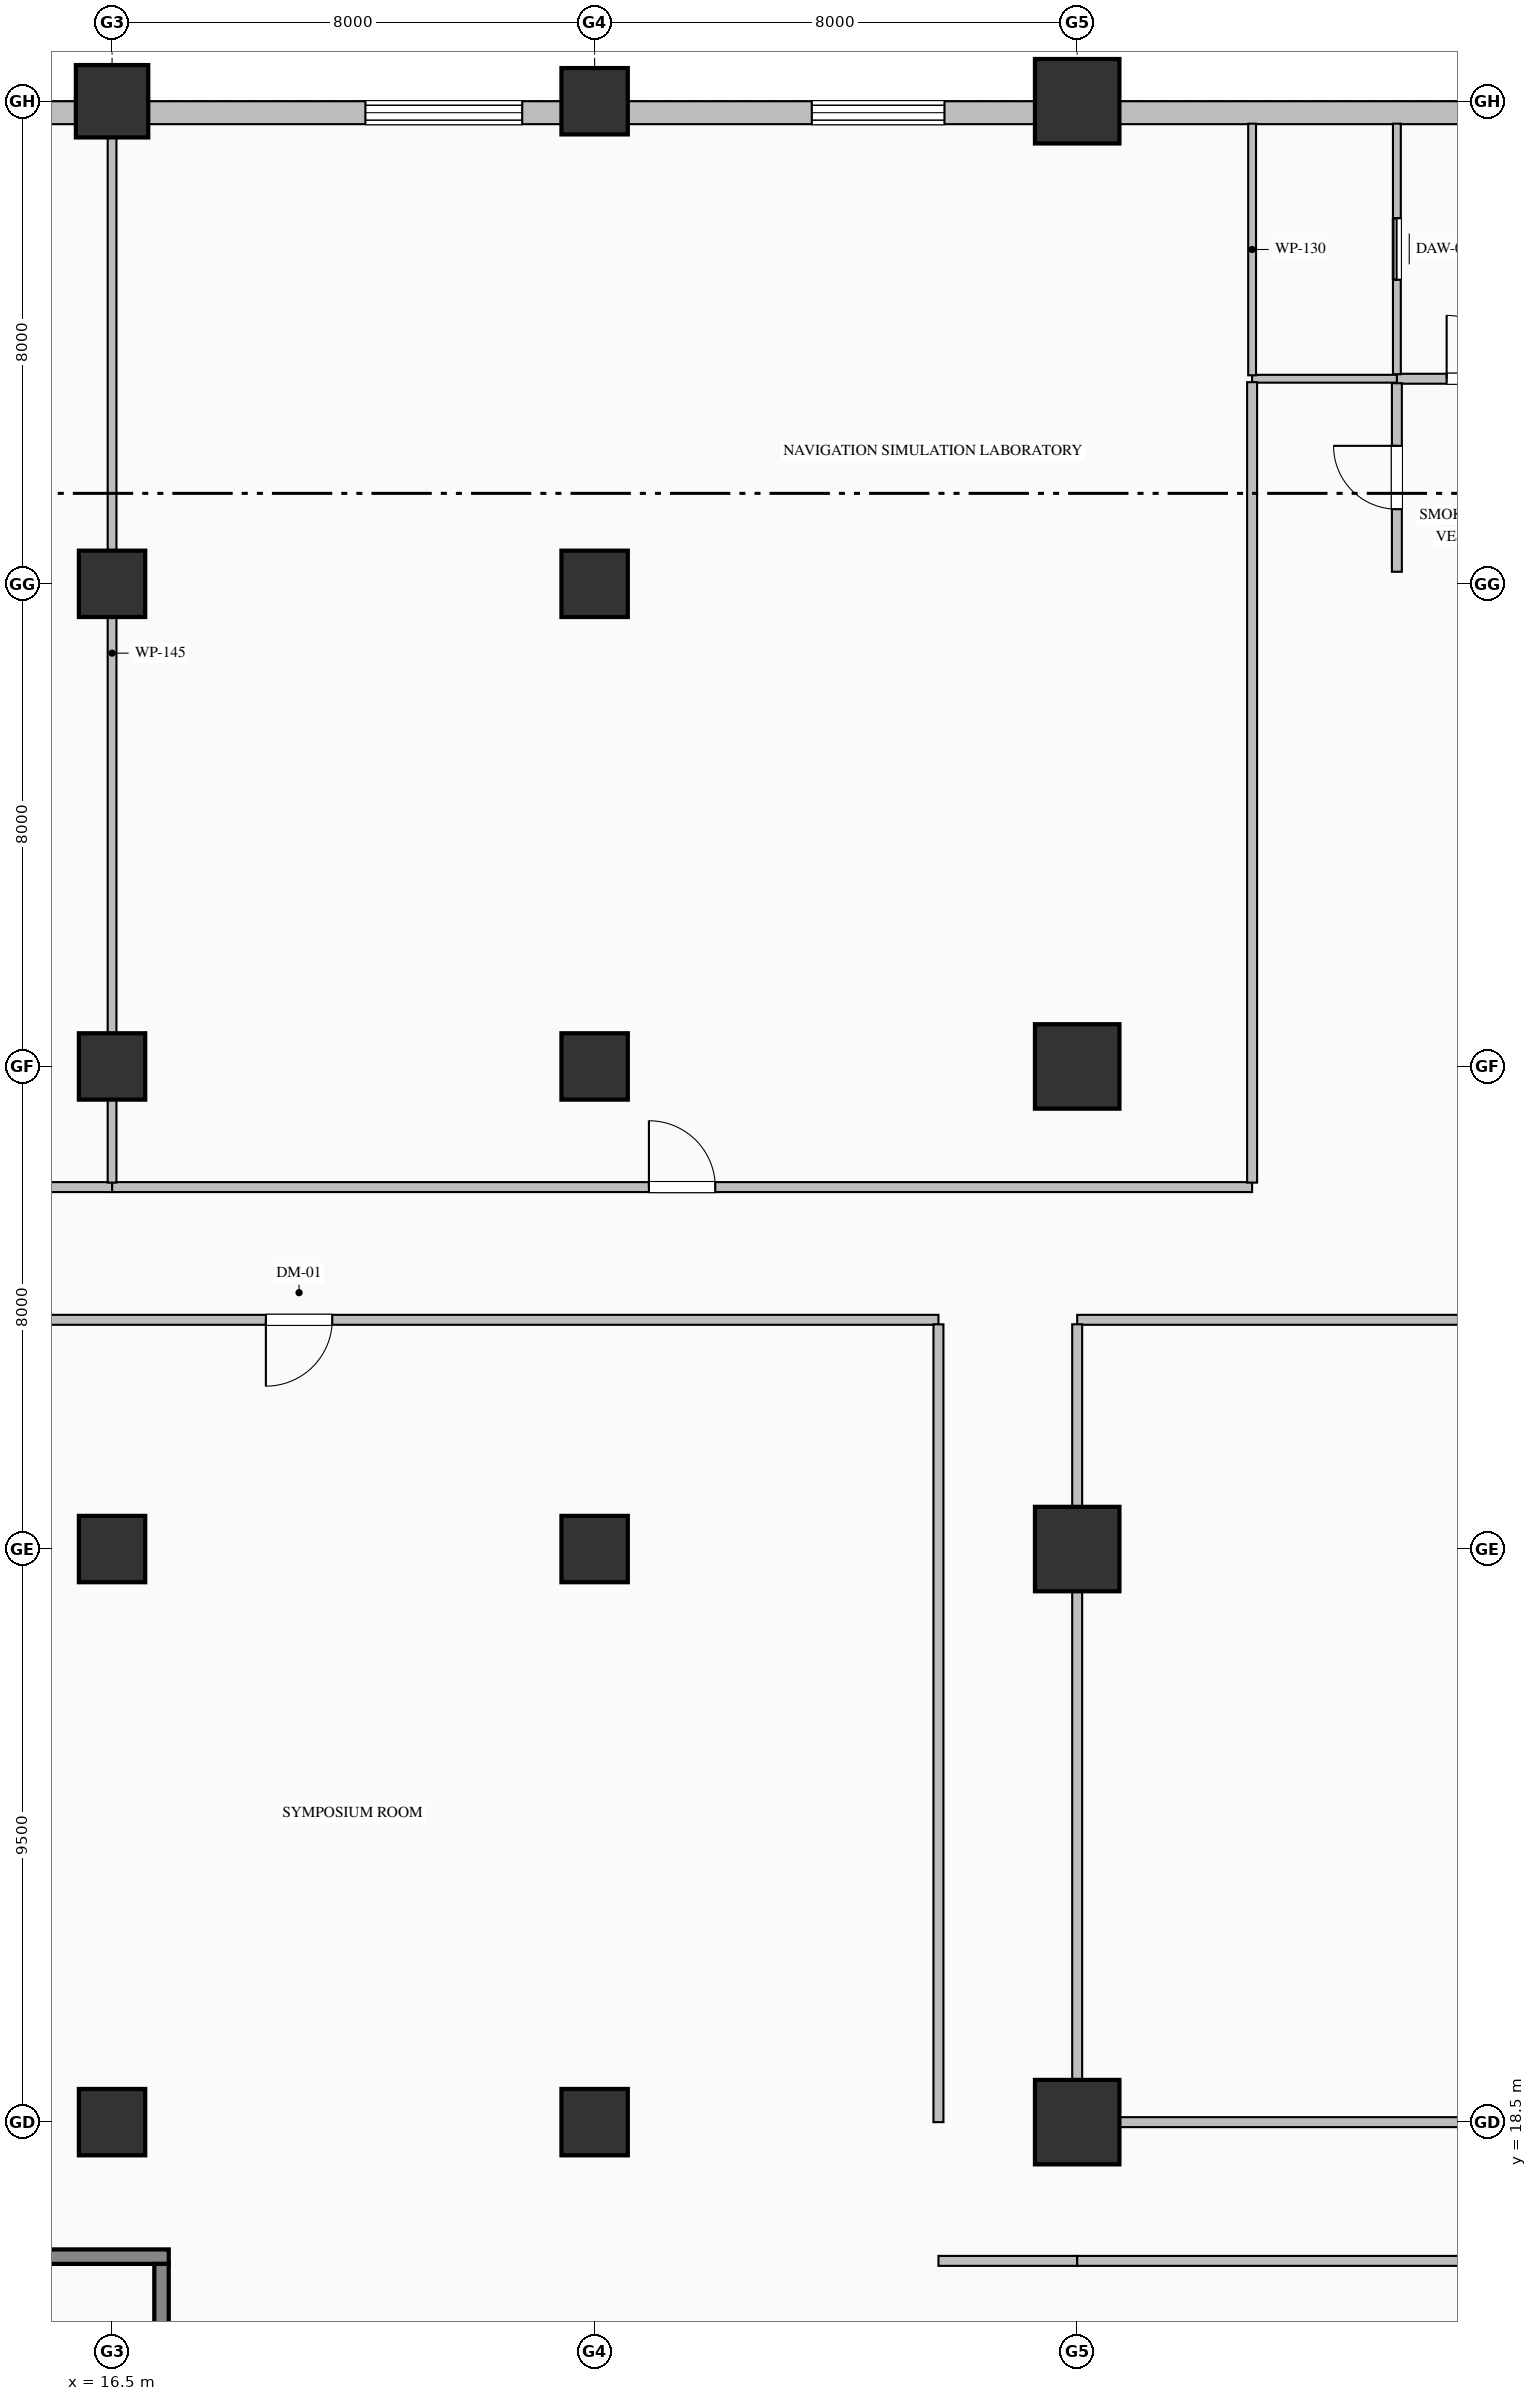
"""IFC4 building model, lengths in metres.
Left out: names, types, materials, properties, quantities, classifications, styles, units other than length and angle.
Written with IfcOpenShell. Run it as: python <this file> out.ifc"""

import sys

from ifc_helpers import new_model, si_unit, direction, frame, frame_2d, origin, origin_2d, place, context, subcontext, project, spatial, rectangle, hollow_rectangle, hollow_circle, extrude, element, fill, save


model = new_model("IFC4")
c1 = context("Model", 3, precision=1e-05, world=origin(), true_north=direction((0.0, 1.0)))
c2 = subcontext(c1, "Body", "Model", "MODEL_VIEW")
j1 = project(units=[si_unit("LENGTHUNIT", "METRE"), si_unit("PLANEANGLEUNIT", "RADIAN")], contexts=[c1])
p1 = place(None, origin())
s1 = spatial("IfcSite", under=j1, at=p1, CompositionType="ELEMENT")
p2 = place(p1, origin())
s2 = spatial("IfcBuilding", under=s1, at=p2, CompositionType="ELEMENT")
p3 = place(p2, frame((0.0, 0.0, 17.4)))
s3 = spatial("IfcBuildingStorey", under=s2, at=p3, CompositionType="ELEMENT", Elevation=17.4)
for number, where, z_axis, x_axis in (
    (1, (16.5, 18.5, -0.45), (0.0, 0.0, 1.0), (1.0, 0.0, 0.0)),
    (2, (16.5, 28.0, -0.45), (0.0, 0.0, 1.0), (1.0, 0.0, 0.0)),
    (3, (16.5, 36.0, -0.45), (0.0, 0.0, 1.0), (1.0, 0.0, 0.0)),
):
    element("IfcColumn", number, at=place(p3, frame(where, z_axis=z_axis, x_axis=x_axis)), inside=s3, PredefinedType="COLUMN", context=c2, shape_type="SweptSolid", body=[
        extrude(rectangle(XDim=1.1, YDim=1.1, at=origin_2d()), origin(), (0.0, 0.0, 1.0), 5.85),
    ])
p4 = place(p3, frame((16.5, 44.0, 0.0), z_axis=(0.0, 0.0, 1.0), x_axis=(1.0, 0.0, 0.0)))
e4 = element("IfcColumn", 4, at=p4, inside=s3, PredefinedType="COLUMN", context=c2, shape_type="SweptSolid", body=[
    extrude(rectangle(XDim=1.1, YDim=1.1, at=origin_2d()), origin(), (0.0, 0.0, 1.0), 5.4),
])
p5 = place(p3, frame((16.5, 52.0, 0.0), z_axis=(0.0, 0.0, 1.0), x_axis=(1.0, 0.0, 0.0)))
e5 = element("IfcColumn", 5, at=p5, inside=s3, PredefinedType="COLUMN", context=c2, shape_type="SweptSolid", body=[
    extrude(hollow_circle(Radius=0.6, WallThickness=0.04, at=origin_2d()), origin(), (0.0, 0.0, 1.0), 5.4),
])
for number, where, z_axis, x_axis in (
    (6, (24.5, 18.5, -0.45), (0.0, 0.0, 1.0), (1.0, 0.0, 0.0)),
    (7, (24.5, 28.0, -0.45), (0.0, 0.0, 1.0), (1.0, 0.0, 0.0)),
    (8, (24.5, 36.0, -0.45), (0.0, 0.0, 1.0), (1.0, 0.0, 0.0)),
):
    element("IfcColumn", number, at=place(p3, frame(where, z_axis=z_axis, x_axis=x_axis)), inside=s3, PredefinedType="COLUMN", context=c2, shape_type="SweptSolid", body=[
        extrude(rectangle(XDim=1.1, YDim=1.1, at=origin_2d()), origin(), (0.0, 0.0, 1.0), 5.85),
    ])
p6 = place(p3, frame((24.5, 44.0, 0.0), z_axis=(0.0, 0.0, 1.0), x_axis=(1.0, 0.0, 0.0)))
e9 = element("IfcColumn", 9, at=p6, inside=s3, PredefinedType="COLUMN", context=c2, shape_type="SweptSolid", body=[
    extrude(rectangle(XDim=1.1, YDim=1.1, at=origin_2d()), origin(), (0.0, 0.0, 1.0), 5.4),
])
p7 = place(p3, frame((24.5, 52.0, 0.0), z_axis=(0.0, 0.0, 1.0), x_axis=(1.0, 0.0, 0.0)))
e10 = element("IfcColumn", 10, at=p7, inside=s3, PredefinedType="COLUMN", context=c2, shape_type="SweptSolid", body=[
    extrude(hollow_rectangle(XDim=1.1, YDim=1.1, WallThickness=0.04, at=origin_2d()), origin(), (0.0, 0.0, 1.0), 5.4),
])
for number, where, z_axis, x_axis in (
    (11, (32.5, 18.5, 0.0), (0.0, 0.0, 1.0), (1.0, 0.0, 0.0)),
    (12, (32.5, 28.0, 0.0), (0.0, 0.0, 1.0), (1.0, 0.0, 0.0)),
    (13, (32.5, 36.0, 0.0), (0.0, 0.0, 1.0), (1.0, 0.0, 0.0)),
    (14, (32.5, 52.0, 0.0), (0.0, 0.0, 1.0), (1.0, 0.0, 0.0)),
):
    element("IfcColumn", number, at=place(p3, frame(where, z_axis=z_axis, x_axis=x_axis)), inside=s3, PredefinedType="COLUMN", context=c2, shape_type="SweptSolid", body=[
        extrude(hollow_rectangle(XDim=1.4, YDim=1.4, WallThickness=0.05, at=origin_2d()), origin(), (0.0, 0.0, 1.0), 5.4),
    ])
p8 = place(p3, frame((4.0, 51.81, 0.0), z_axis=(0.0, 0.0, 1.0), x_axis=(1.0, 0.0, 0.0)))
e15 = element("IfcWall", 15, at=p8, inside=s3, PredefinedType="SOLIDWALL", context=c2, shape_type="SweptSolid", body=[
    extrude(rectangle(XDim=36.52, YDim=0.38, at=frame_2d((18.26, 0.0))), origin(), (0.0, 0.0, 1.0), 4.64),
])
p9 = place(p8, frame((16.7, 0.0, 0.85)))
e16 = element("IfcOpeningElement", 16, at=p9, cuts=e15, PredefinedType="OPENING", context=c2, shape_type="SweptSolid", body=[
    extrude(rectangle(XDim=2.6, YDim=3.1, at=frame_2d((1.3, 1.55))), frame((0.0, 0.2, 0.0), z_axis=(0.0, -1.0, 0.0), x_axis=(1.0, 0.0, 0.0)), (0.0, 0.0, 1.0), 0.4),
])
p10 = place(p8, frame((24.1, 0.0, 0.9)))
e17 = element("IfcOpeningElement", 17, at=p10, cuts=e15, PredefinedType="OPENING", context=c2, shape_type="SweptSolid", body=[
    extrude(rectangle(XDim=2.2, YDim=2.65, at=frame_2d((1.1, 1.325))), frame((0.0, 0.2, 0.0), z_axis=(0.0, -1.0, 0.0), x_axis=(1.0, 0.0, 0.0)), (0.0, 0.0, 1.0), 0.4),
])
p11 = place(p3, frame((9.16, 16.27, 0.0), z_axis=(0.0, 0.0, 1.0), x_axis=(1.0, 0.0, 0.0)))
e18 = element("IfcWall", 18, at=p11, inside=s3, PredefinedType="SOLIDWALL", context=c2, shape_type="SweptSolid", body=[
    extrude(rectangle(XDim=8.28, YDim=0.24, at=frame_2d((4.14, 0.0))), origin(), (0.0, 0.0, 1.0), 5.4),
])
p12 = place(p3, frame((17.32, 12.8, 0.0), z_axis=(0.0, 0.0, 1.0), x_axis=(0.0, 1.0, 0.0)))
e19 = element("IfcWall", 19, at=p12, inside=s3, PredefinedType="SOLIDWALL", context=c2, shape_type="SweptSolid", body=[
    extrude(rectangle(XDim=3.35, YDim=0.24, at=frame_2d((1.675, 0.0))), origin(), (0.0, 0.0, 1.0), 5.4),
])
p13 = place(p3, frame((37.8, 47.4, 0.0), z_axis=(0.0, 0.0, 1.0), x_axis=(1.0, 0.0, 0.0)))
e20 = element("IfcWall", 20, at=p13, inside=s3, PredefinedType="PARTITIONING", context=c2, shape_type="SweptSolid", body=[
    extrude(rectangle(XDim=2.7, YDim=0.165, at=frame_2d((1.35, 0.0))), origin(), (0.0, 0.0, 1.0), 5.14),
])
p14 = place(p13, frame((0.825, 0.0, 0.0)))
e21 = element("IfcOpeningElement", 21, at=p14, cuts=e20, PredefinedType="OPENING", context=c2, shape_type="SweptSolid", body=[
    extrude(rectangle(XDim=1.05, YDim=2.15, at=frame_2d((0.525, 1.075))), frame((0.0, 0.093, 0.0), z_axis=(0.0, -1.0, 0.0), x_axis=(1.0, 0.0, 0.0)), (0.0, 0.0, 1.0), 0.185),
])
p15 = place(p3, frame((37.8, 44.2, 0.0), z_axis=(0.0, 0.0, 1.0), x_axis=(0.0, 1.0, 0.0)))
e22 = element("IfcWall", 22, at=p15, inside=s3, PredefinedType="PARTITIONING", context=c2, shape_type="SweptSolid", body=[
    extrude(rectangle(XDim=3.125, YDim=0.165, at=frame_2d((1.563, 0.0))), origin(), (0.0, 0.0, 1.0), 5.14),
])
p16 = place(p15, frame((1.038, 0.0, 0.0)))
e23 = element("IfcOpeningElement", 23, at=p16, cuts=e22, PredefinedType="OPENING", context=c2, shape_type="SweptSolid", body=[
    extrude(rectangle(XDim=1.05, YDim=2.15, at=frame_2d((0.525, 1.075))), frame((0.0, 0.093, 0.0), z_axis=(0.0, -1.0, 0.0), x_axis=(1.0, 0.0, 0.0)), (0.0, 0.0, 1.0), 0.185),
])
p17 = place(p3, frame((37.8, 47.475, 0.0), z_axis=(0.0, 0.0, 1.0), x_axis=(0.0, 1.0, 0.0)))
e24 = element("IfcWall", 24, at=p17, inside=s3, PredefinedType="PARTITIONING", context=c2, shape_type="SweptSolid", body=[
    extrude(rectangle(XDim=4.153, YDim=0.13, at=frame_2d((2.077, 0.0))), origin(), (0.0, 0.0, 1.0), 5.14),
])
p18 = place(p17, frame((1.567, 0.0, 0.0)))
e25 = element("IfcOpeningElement", 25, at=p18, cuts=e24, PredefinedType="OPENING", context=c2, shape_type="SweptSolid", body=[
    extrude(rectangle(XDim=1.02, YDim=2.15, at=frame_2d((0.51, 1.075))), frame((0.0, 0.075, 0.0), z_axis=(0.0, -1.0, 0.0), x_axis=(1.0, 0.0, 0.0)), (0.0, 0.0, 1.0), 0.15),
])
p19 = place(p3, frame((37.8, 47.4, 0.0), z_axis=(0.0, 0.0, 1.0), x_axis=(-1.0, 0.0, 0.0)))
e26 = element("IfcWall", 26, at=p19, inside=s3, PredefinedType="PARTITIONING", context=c2, shape_type="SweptSolid", body=[
    extrude(rectangle(XDim=2.4, YDim=0.13, at=frame_2d((1.2, 0.0))), origin(), (0.0, 0.0, 1.0), 5.14),
])
p20 = place(p3, frame((35.4, 47.457, 0.0), z_axis=(0.0, 0.0, 1.0), x_axis=(0.0, 1.0, 0.0)))
e27 = element("IfcWall", 27, at=p20, inside=s3, PredefinedType="PARTITIONING", context=c2, shape_type="SweptSolid", body=[
    extrude(rectangle(XDim=4.171, YDim=0.13, at=frame_2d((2.085, 0.0))), origin(), (0.0, 0.0, 1.0), 5.14),
])
p21 = place(p3, frame((56.5, 31.8, 0.0), z_axis=(0.0, 0.0, 1.0), x_axis=(-1.0, 0.0, 0.0)))
e28 = element("IfcWall", 28, at=p21, inside=s3, PredefinedType="PARTITIONING", context=c2, shape_type="SweptSolid", body=[
    extrude(rectangle(XDim=24.0, YDim=0.165, at=frame_2d((12.0, 0.0))), origin(), (0.0, 0.0, 1.0), 5.14),
])
p22 = place(p21, frame((11.45, 0.0, 0.0)))
e29 = element("IfcOpeningElement", 29, at=p22, cuts=e28, PredefinedType="OPENING", context=c2, shape_type="SweptSolid", body=[
    extrude(rectangle(XDim=1.1, YDim=2.2, at=frame_2d((0.55, 1.1))), frame((0.0, 0.093, 0.0), z_axis=(0.0, -1.0, 0.0), x_axis=(1.0, 0.0, 0.0)), (0.0, 0.0, 1.0), 0.185),
])
p23 = place(p3, frame((30.2, 31.8, 0.0), z_axis=(0.0, 0.0, 1.0), x_axis=(-1.0, 0.0, 0.0)))
e30 = element("IfcWall", 30, at=p23, inside=s3, PredefinedType="PARTITIONING", context=c2, shape_type="SweptSolid", body=[
    extrude(rectangle(XDim=21.2, YDim=0.165, at=frame_2d((10.6, 0.0))), origin(), (0.0, 0.0, 1.0), 5.14),
])
p24 = place(p23, frame((10.05, 0.0, 0.0)))
e31 = element("IfcOpeningElement", 31, at=p24, cuts=e30, PredefinedType="OPENING", context=c2, shape_type="SweptSolid", body=[
    extrude(rectangle(XDim=1.1, YDim=2.2, at=frame_2d((0.55, 1.1))), frame((0.0, 0.093, 0.0), z_axis=(0.0, -1.0, 0.0), x_axis=(1.0, 0.0, 0.0)), (0.0, 0.0, 1.0), 0.185),
])
p25 = place(p3, frame((16.5, 34.0, 0.0), z_axis=(0.0, 0.0, 1.0), x_axis=(1.0, 0.0, 0.0)))
e32 = element("IfcWall", 32, at=p25, inside=s3, PredefinedType="PARTITIONING", context=c2, shape_type="SweptSolid", body=[
    extrude(rectangle(XDim=18.9, YDim=0.165, at=frame_2d((9.45, 0.0))), origin(), (0.0, 0.0, 1.0), 5.14),
])
p26 = place(p25, frame((8.9, 0.0, 0.0)))
e33 = element("IfcOpeningElement", 33, at=p26, cuts=e32, PredefinedType="OPENING", context=c2, shape_type="SweptSolid", body=[
    extrude(rectangle(XDim=1.1, YDim=2.2, at=frame_2d((0.55, 1.1))), frame((0.0, 0.093, 0.0), z_axis=(0.0, -1.0, 0.0), x_axis=(1.0, 0.0, 0.0)), (0.0, 0.0, 1.0), 0.185),
])
p27 = place(p3, frame((9.0, 34.0, 0.0), z_axis=(0.0, 0.0, 1.0), x_axis=(1.0, 0.0, 0.0)))
e34 = element("IfcWall", 34, at=p27, inside=s3, PredefinedType="PARTITIONING", context=c2, shape_type="SweptSolid", body=[
    extrude(rectangle(XDim=7.5, YDim=0.165, at=frame_2d((3.75, 0.0))), origin(), (0.0, 0.0, 1.0), 5.14),
])
p28 = place(p27, frame((3.25, 0.0, 0.0)))
e35 = element("IfcOpeningElement", 35, at=p28, cuts=e34, PredefinedType="OPENING", context=c2, shape_type="SweptSolid", body=[
    extrude(rectangle(XDim=1.0, YDim=2.15, at=frame_2d((0.5, 1.075))), frame((0.0, 0.093, 0.0), z_axis=(0.0, -1.0, 0.0), x_axis=(1.0, 0.0, 0.0)), (0.0, 0.0, 1.0), 0.185),
])
p29 = place(p3, frame((35.4, 34.074, 0.0), z_axis=(0.0, 0.0, 1.0), x_axis=(0.0, 1.0, 0.0)))
e36 = element("IfcWall", 36, at=p29, inside=s3, PredefinedType="PARTITIONING", context=c2, shape_type="SweptSolid", body=[
    extrude(rectangle(XDim=13.269, YDim=0.165, at=frame_2d((6.634, 0.0))), origin(), (0.0, 0.0, 1.0), 5.14),
])
p30 = place(p3, frame((32.5, 31.726, 0.0), z_axis=(0.0, 0.0, 1.0), x_axis=(0.0, -1.0, 0.0)))
e37 = element("IfcWall", 37, at=p30, inside=s3, PredefinedType="PARTITIONING", context=c2, shape_type="SweptSolid", body=[
    extrude(rectangle(XDim=13.151, YDim=0.165, at=frame_2d((6.576, 0.0))), origin(), (0.0, 0.0, 1.0), 4.232),
])
p31 = place(p3, frame((30.2, 18.5, 0.0), z_axis=(0.0, 0.0, 1.0), x_axis=(0.0, 1.0, 0.0)))
e38 = element("IfcWall", 38, at=p31, inside=s3, PredefinedType="PARTITIONING", context=c2, shape_type="SweptSolid", body=[
    extrude(rectangle(XDim=13.226, YDim=0.165, at=frame_2d((6.613, 0.0))), origin(), (0.0, 0.0, 1.0), 5.14),
])
p32 = place(p3, frame((32.5, 16.2, 0.0), z_axis=(0.0, 0.0, 1.0), x_axis=(-1.0, 0.0, 0.0)))
e39 = element("IfcWall", 39, at=p32, inside=s3, PredefinedType="PARTITIONING", context=c2, shape_type="SweptSolid", body=[
    extrude(rectangle(XDim=2.3, YDim=0.165, at=frame_2d((1.15, 0.0))), origin(), (0.0, 0.0, 1.0), 5.14),
])
p33 = place(p3, frame((32.5, 18.5, 0.0), z_axis=(0.0, 0.0, 1.0), x_axis=(1.0, 0.0, 0.0)))
e40 = element("IfcWall", 40, at=p33, inside=s3, PredefinedType="PARTITIONING", context=c2, shape_type="SweptSolid", body=[
    extrude(rectangle(XDim=24.0, YDim=0.165, at=frame_2d((12.0, 0.0))), origin(), (0.0, 0.0, 1.0), 4.232),
])
p34 = place(p3, frame((48.5, 16.2, 0.0), z_axis=(0.0, 0.0, 1.0), x_axis=(-1.0, 0.0, 0.0)))
e41 = element("IfcWall", 41, at=p34, inside=s3, PredefinedType="PARTITIONING", context=c2, shape_type="SweptSolid", body=[
    extrude(rectangle(XDim=16.0, YDim=0.165, at=frame_2d((8.0, 0.0))), origin(), (0.0, 0.0, 1.0), 5.14),
])
p35 = place(p34, frame((7.45, 0.0, 0.0)))
e42 = element("IfcOpeningElement", 42, at=p35, cuts=e41, PredefinedType="OPENING", context=c2, shape_type="SweptSolid", body=[
    extrude(rectangle(XDim=1.1, YDim=2.2, at=frame_2d((0.55, 1.1))), frame((0.0, 0.093, 0.0), z_axis=(0.0, -1.0, 0.0), x_axis=(1.0, 0.0, 0.0)), (0.0, 0.0, 1.0), 0.185),
])
p36 = place(p3, frame((16.5, 34.074, 0.0), z_axis=(0.0, 0.0, 1.0), x_axis=(0.0, 1.0, 0.0)))
e43 = element("IfcWall", 43, at=p36, inside=s3, PredefinedType="PARTITIONING", context=c2, shape_type="SweptSolid", body=[
    extrude(rectangle(XDim=17.553, YDim=0.145, at=frame_2d((8.777, 0.0))), origin(), (0.0, 0.0, 1.0), 4.232),
])
p37 = place(p9, origin())
e44 = element("IfcWindow", 44, at=p37, inside=s3, PartitioningType="TRIPLE_PANEL_VERTICAL", PredefinedType="WINDOW", context=c2, shape_type="SweptSolid", body=[
    extrude(rectangle(XDim=2.6, YDim=3.1, at=frame_2d((1.3, 1.55))), frame((0.0, 0.15, 0.0), z_axis=(0.0, -1.0, 0.0), x_axis=(1.0, 0.0, 0.0)), (0.0, 0.0, 1.0), 0.06),
])
fill(e16, e44)
p38 = place(p10, origin())
e45 = element("IfcWindow", 45, at=p38, inside=s3, PartitioningType="TRIPLE_PANEL_VERTICAL", PredefinedType="WINDOW", context=c2, shape_type="SweptSolid", body=[
    extrude(rectangle(XDim=2.2, YDim=2.65, at=frame_2d((1.1, 1.325))), frame((0.0, 0.15, 0.0), z_axis=(0.0, -1.0, 0.0), x_axis=(1.0, 0.0, 0.0)), (0.0, 0.0, 1.0), 0.06),
])
fill(e17, e45)
p39 = place(p16, origin())
e46 = element("IfcDoor", 46, at=p39, inside=s3, OperationType="SINGLE_SWING_RIGHT", PredefinedType="DOOR", context=c2, shape_type="SweptSolid", body=[
    extrude(rectangle(XDim=1.05, YDim=2.15, at=frame_2d((0.525, 1.075))), frame((0.0, 0.025, 0.0), z_axis=(0.0, -1.0, 0.0), x_axis=(1.0, 0.0, 0.0)), (0.0, 0.0, 1.0), 0.05),
])
fill(e23, e46)
p40 = place(p14, origin())
e47 = element("IfcDoor", 47, at=p40, inside=s3, OperationType="SINGLE_SWING_LEFT", PredefinedType="DOOR", context=c2, shape_type="SweptSolid", body=[
    extrude(rectangle(XDim=1.05, YDim=2.15, at=frame_2d((0.525, 1.075))), frame((0.0, 0.025, 0.0), z_axis=(0.0, -1.0, 0.0), x_axis=(1.0, 0.0, 0.0)), (0.0, 0.0, 1.0), 0.05),
])
fill(e21, e47)
p41 = place(p18, origin())
e48 = element("IfcDoor", 48, at=p41, inside=s3, OperationType="SLIDING_TO_LEFT", PredefinedType="DOOR", context=c2, shape_type="SweptSolid", body=[
    extrude(rectangle(XDim=1.02, YDim=2.15, at=frame_2d((0.51, 1.075))), frame((0.0, 0.025, 0.0), z_axis=(0.0, -1.0, 0.0), x_axis=(1.0, 0.0, 0.0)), (0.0, 0.0, 1.0), 0.05),
])
fill(e25, e48)
p42 = place(p24, origin())
e49 = element("IfcDoor", 49, at=p42, inside=s3, OperationType="SINGLE_SWING_RIGHT", PredefinedType="DOOR", context=c2, shape_type="SweptSolid", body=[
    extrude(rectangle(XDim=1.1, YDim=2.2, at=frame_2d((0.55, 1.1))), frame((0.0, 0.025, 0.0), z_axis=(0.0, -1.0, 0.0), x_axis=(1.0, 0.0, 0.0)), (0.0, 0.0, 1.0), 0.05),
])
fill(e31, e49)
p43 = place(p26, origin())
e50 = element("IfcDoor", 50, at=p43, inside=s3, OperationType="SINGLE_SWING_LEFT", PredefinedType="DOOR", context=c2, shape_type="SweptSolid", body=[
    extrude(rectangle(XDim=1.1, YDim=2.2, at=frame_2d((0.55, 1.1))), frame((0.0, 0.025, 0.0), z_axis=(0.0, -1.0, 0.0), x_axis=(1.0, 0.0, 0.0)), (0.0, 0.0, 1.0), 0.05),
])
fill(e33, e50)
save(model, sys.argv[1])
